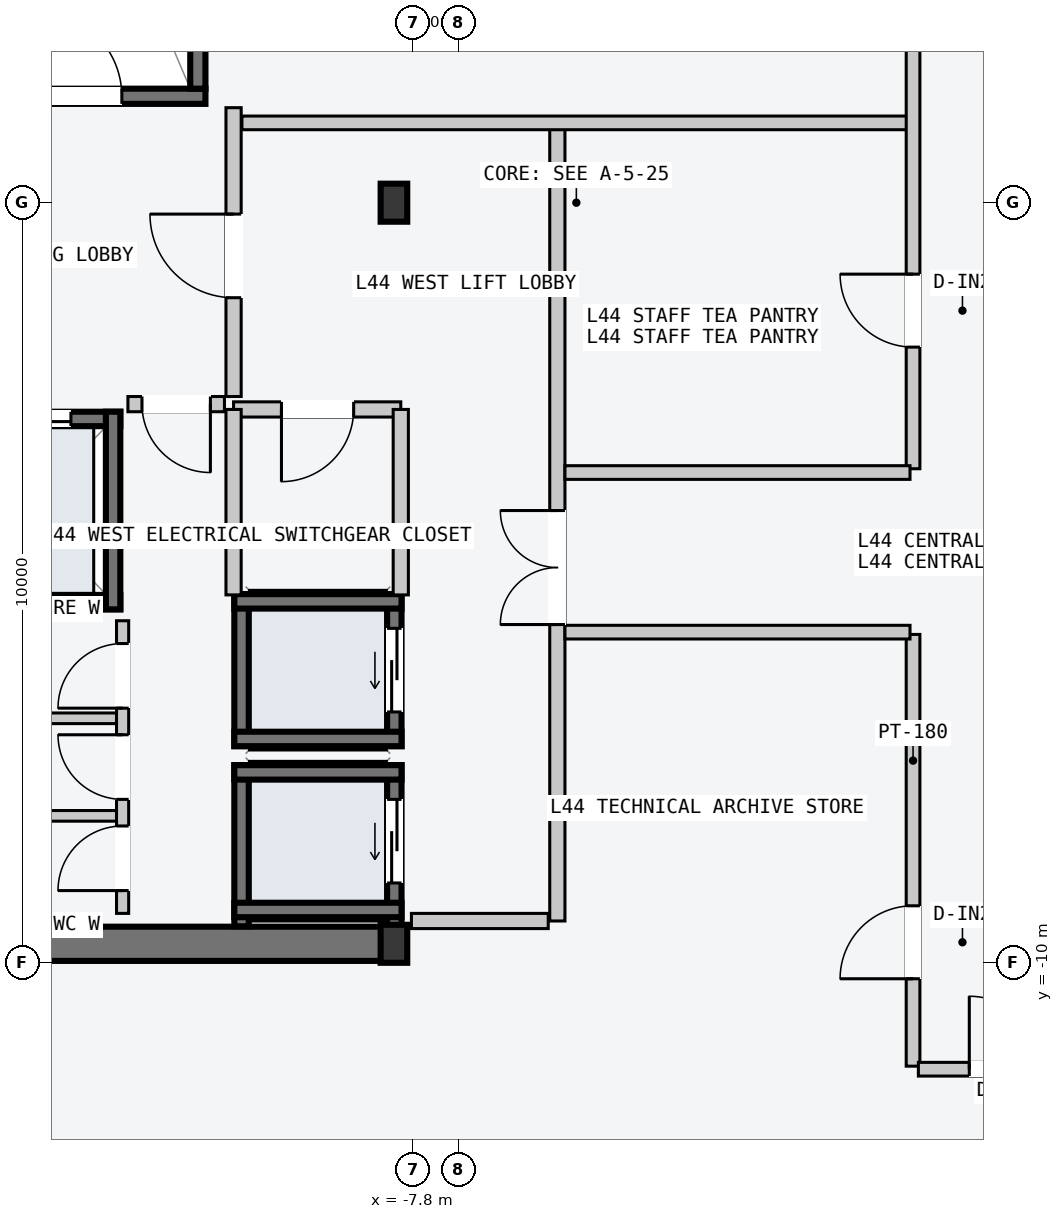
"""IFC4 building model, lengths in metres.
Left out: names, types, materials, properties, quantities, classifications, styles, units other than length and angle.
Written with IfcOpenShell. Run it as: python <this file> out.ifc"""

import sys

from ifc_helpers import new_model, si_unit, direction, frame, frame_2d, origin, origin_2d, place, context, subcontext, project, spatial, rectangle, i_section, extrude, element, fill, save


model = new_model("IFC4")
c1 = context("Model", 3, precision=1e-05, world=origin(), true_north=direction((0.0, 1.0)))
c2 = subcontext(c1, "Body", "Model", "MODEL_VIEW")
j1 = project(units=[si_unit("LENGTHUNIT", "METRE"), si_unit("PLANEANGLEUNIT", "RADIAN")], contexts=[c1])
p1 = place(None, origin())
s1 = spatial("IfcSite", under=j1, at=p1, CompositionType="ELEMENT")
p2 = place(p1, origin())
s2 = spatial("IfcBuilding", under=s1, at=p2, CompositionType="ELEMENT")
p3 = place(p2, frame((0.0, 0.0, 169.5)))
s3 = spatial("IfcBuildingStorey", under=s2, at=p3, CompositionType="ELEMENT", Elevation=169.5)
p4 = place(p3, frame((-14.53, -9.75, -0.2), z_axis=(0.0, 0.0, 1.0), x_axis=(1.0, 0.0, 0.0)))
e1 = element("IfcWall", 1, at=p4, inside=s3, PredefinedType="SHEAR", context=c2, shape_type="SweptSolid", body=[
    extrude(rectangle(XDim=6.46, YDim=0.45, at=frame_2d((3.23, 0.0))), origin(), (0.0, 0.0, 1.0), 3.6),
])
p5 = place(p3, frame((-14.25, 1.4, -0.2), z_axis=(0.0, 0.0, 1.0), x_axis=(1.0, 0.0, 0.0)))
e2 = element("IfcWall", 2, at=p5, inside=s3, PredefinedType="SOLIDWALL", context=c2, shape_type="SweptSolid", body=[
    extrude(rectangle(XDim=3.72, YDim=0.2, at=frame_2d((1.86, 0.0))), origin(), (0.0, 0.0, 1.0), 3.6),
])
p6 = place(p5, frame((1.5, 0.0, 0.2)))
e3 = element("IfcOpeningElement", 3, at=p6, cuts=e2, PredefinedType="OPENING", context=c2, shape_type="SweptSolid", body=[
    extrude(rectangle(XDim=1.12, YDim=2.18, at=frame_2d((0.56, 1.09))), frame((0.0, 0.11, 0.0), z_axis=(0.0, -1.0, 0.0), x_axis=(1.0, 0.0, 0.0)), (0.0, 0.0, 1.0), 0.22),
])
p7 = place(p3, frame((-10.63, 1.5, -0.2), z_axis=(0.0, 0.0, 1.0), x_axis=(0.0, 1.0, 0.0)))
e4 = element("IfcWall", 4, at=p7, inside=s3, PredefinedType="SOLIDWALL", context=c2, shape_type="SweptSolid", body=[
    extrude(rectangle(XDim=7.8, YDim=0.2, at=frame_2d((3.9, 0.0))), origin(), (0.0, 0.0, 1.0), 3.6),
])
for number, where, z_axis, x_axis in (
    (5, (-8.05, -9.75, 0.0), (0.0, 0.0, 1.0), (1.0, 0.0, 0.0)),
    (6, (-8.05, 0.0, 0.0), (0.0, 0.0, 1.0), (1.0, 0.0, 0.0)),
):
    element("IfcColumn", number, at=place(p3, frame(where, z_axis=z_axis, x_axis=x_axis)), inside=s3, PredefinedType="COLUMN", context=c2, shape_type="SweptSolid", body=[
        extrude(i_section(OverallWidth=0.35, OverallDepth=0.5, WebThickness=0.02, FlangeThickness=0.032, at=origin_2d()), origin(), (0.0, 0.0, 1.0), 3.6),
    ])
p8 = place(p3, frame((-8.045, -9.52, -0.2), z_axis=(0.0, 0.0, 1.0), x_axis=(0.0, 1.0, 0.0)))
e7 = element("IfcWall", 7, at=p8, inside=s3, PredefinedType="SOLIDWALL", context=c2, shape_type="SweptSolid", body=[
    extrude(rectangle(XDim=2.12, YDim=0.19, at=frame_2d((1.06, 0.0))), origin(), (0.0, 0.0, 1.0), 3.6),
])
p9 = place(p8, frame((0.57, 0.0, 0.2)))
e8 = element("IfcOpeningElement", 8, at=p9, cuts=e7, PredefinedType="OPENING", context=c2, shape_type="SweptSolid", body=[
    extrude(rectangle(XDim=1.1, YDim=2.2, at=frame_2d((0.55, 1.1))), frame((0.0, 0.105, 0.0), z_axis=(0.0, -1.0, 0.0), x_axis=(1.0, 0.0, 0.0)), (0.0, 0.0, 1.0), 0.21),
])
p10 = place(p3, frame((-10.055, -9.52, -0.2), z_axis=(0.0, 0.0, 1.0), x_axis=(0.0, 1.0, 0.0)))
e9 = element("IfcWall", 9, at=p10, inside=s3, PredefinedType="SOLIDWALL", context=c2, shape_type="SweptSolid", body=[
    extrude(rectangle(XDim=2.12, YDim=0.19, at=frame_2d((1.06, 0.0))), origin(), (0.0, 0.0, 1.0), 3.6),
])
for number, where, z_axis, x_axis in (
    (10, (-10.15, -7.495, -0.2), (0.0, 0.0, 1.0), (1.0, 0.0, 0.0)),
    (11, (-10.15, -9.305, -0.2), (0.0, 0.0, 1.0), (1.0, 0.0, 0.0)),
):
    element("IfcWall", number, at=place(p3, frame(where, z_axis=z_axis, x_axis=x_axis)), inside=s3, PredefinedType="SOLIDWALL", context=c2, shape_type="SweptSolid", body=[
        extrude(rectangle(XDim=2.2, YDim=0.19, at=frame_2d((1.1, 0.0))), origin(), (0.0, 0.0, 1.0), 3.6),
    ])
p11 = place(p3, frame((-8.045, -7.15, -0.2), z_axis=(0.0, 0.0, 1.0), x_axis=(0.0, 1.0, 0.0)))
e12 = element("IfcWall", 12, at=p11, inside=s3, PredefinedType="SOLIDWALL", context=c2, shape_type="SweptSolid", body=[
    extrude(rectangle(XDim=2.0, YDim=0.19, at=frame_2d((1.0, 0.0))), origin(), (0.0, 0.0, 1.0), 3.6),
])
p12 = place(p11, frame((0.45, 0.0, 0.2)))
e13 = element("IfcOpeningElement", 13, at=p12, cuts=e12, PredefinedType="OPENING", context=c2, shape_type="SweptSolid", body=[
    extrude(rectangle(XDim=1.1, YDim=2.2, at=frame_2d((0.55, 1.1))), frame((0.0, 0.105, 0.0), z_axis=(0.0, -1.0, 0.0), x_axis=(1.0, 0.0, 0.0)), (0.0, 0.0, 1.0), 0.21),
])
p13 = place(p3, frame((-10.055, -7.15, -0.2), z_axis=(0.0, 0.0, 1.0), x_axis=(0.0, 1.0, 0.0)))
e14 = element("IfcWall", 14, at=p13, inside=s3, PredefinedType="SOLIDWALL", context=c2, shape_type="SweptSolid", body=[
    extrude(rectangle(XDim=2.0, YDim=0.19, at=frame_2d((1.0, 0.0))), origin(), (0.0, 0.0, 1.0), 3.6),
])
for number, where, z_axis, x_axis in (
    (15, (-10.15, -5.245, -0.2), (0.0, 0.0, 1.0), (1.0, 0.0, 0.0)),
    (16, (-10.15, -7.055, -0.2), (0.0, 0.0, 1.0), (1.0, 0.0, 0.0)),
):
    element("IfcWall", number, at=place(p3, frame(where, z_axis=z_axis, x_axis=x_axis)), inside=s3, PredefinedType="SOLIDWALL", context=c2, shape_type="SweptSolid", body=[
        extrude(rectangle(XDim=2.2, YDim=0.19, at=frame_2d((1.1, 0.0))), origin(), (0.0, 0.0, 1.0), 3.6),
    ])
p14 = place(p3, frame((-14.33, -2.845, -0.2), z_axis=(0.0, 0.0, 1.0), x_axis=(1.0, 0.0, 0.0)))
e17 = element("IfcWall", 17, at=p14, inside=s3, PredefinedType="SOLIDWALL", context=c2, shape_type="SweptSolid", body=[
    extrude(rectangle(XDim=2.68, YDim=0.19, at=frame_2d((1.34, 0.0))), origin(), (0.0, 0.0, 1.0), 3.6),
])
p15 = place(p14, frame((0.83, 0.0, 0.2)))
e18 = element("IfcOpeningElement", 18, at=p15, cuts=e17, PredefinedType="OPENING", context=c2, shape_type="SweptSolid", body=[
    extrude(rectangle(XDim=1.2, YDim=2.2, at=frame_2d((0.6, 1.1))), frame((0.0, 0.105, 0.0), z_axis=(0.0, -1.0, 0.0), x_axis=(1.0, 0.0, 0.0)), (0.0, 0.0, 1.0), 0.21),
])
p16 = place(p3, frame((-14.33, -5.255, -0.2), z_axis=(0.0, 0.0, 1.0), x_axis=(1.0, 0.0, 0.0)))
e19 = element("IfcWall", 19, at=p16, inside=s3, PredefinedType="SOLIDWALL", context=c2, shape_type="SweptSolid", body=[
    extrude(rectangle(XDim=2.68, YDim=0.19, at=frame_2d((1.34, 0.0))), origin(), (0.0, 0.0, 1.0), 3.6),
])
p17 = place(p3, frame((-11.745, -5.35, -0.2), z_axis=(0.0, 0.0, 1.0), x_axis=(0.0, 1.0, 0.0)))
e20 = element("IfcWall", 20, at=p17, inside=s3, PredefinedType="SOLIDWALL", context=c2, shape_type="SweptSolid", body=[
    extrude(rectangle(XDim=2.6, YDim=0.19, at=frame_2d((1.3, 0.0))), origin(), (0.0, 0.0, 1.0), 3.6),
])
p18 = place(p3, frame((-5.9, -9.45, 0.0), z_axis=(0.0, 0.0, 1.0), x_axis=(0.0, 1.0, 0.0)))
e21 = element("IfcWall", 21, at=p18, inside=s3, PredefinedType="PARTITIONING", context=c2, shape_type="SweptSolid", body=[
    extrude(rectangle(XDim=10.5, YDim=0.2, at=frame_2d((5.25, 0.0))), origin(), (0.0, 0.0, 1.0), 3.4),
])
p19 = place(p18, frame((3.9, 0.0, 0.0)))
e22 = element("IfcOpeningElement", 22, at=p19, cuts=e21, PredefinedType="OPENING", context=c2, shape_type="SweptSolid", body=[
    extrude(rectangle(XDim=1.5, YDim=2.2, at=frame_2d((0.75, 1.1))), frame((0.0, 0.11, 0.0), z_axis=(0.0, -1.0, 0.0), x_axis=(1.0, 0.0, 0.0)), (0.0, 0.0, 1.0), 0.22),
])
p20 = place(p3, frame((-6.02, -9.45, 0.0), z_axis=(0.0, 0.0, 1.0), x_axis=(-1.0, 0.0, 0.0)))
e23 = element("IfcWall", 23, at=p20, inside=s3, PredefinedType="PARTITIONING", context=c2, shape_type="SweptSolid", body=[
    extrude(rectangle(XDim=1.8, YDim=0.2, at=frame_2d((0.9, 0.0))), origin(), (0.0, 0.0, 1.0), 3.4),
])
p21 = place(p3, frame((-10.16, -2.55, 0.0), z_axis=(0.0, 0.0, 1.0), x_axis=(0.0, 1.0, 0.0)))
e24 = element("IfcWall", 24, at=p21, inside=s3, PredefinedType="PARTITIONING", context=c2, shape_type="SweptSolid", body=[
    extrude(rectangle(XDim=3.8, YDim=0.2, at=frame_2d((1.9, 0.0))), origin(), (0.0, 0.0, 1.0), 3.4),
])
p22 = place(p21, frame((1.3, 0.0, 0.0)))
e25 = element("IfcOpeningElement", 25, at=p22, cuts=e24, PredefinedType="OPENING", context=c2, shape_type="SweptSolid", body=[
    extrude(rectangle(XDim=1.1, YDim=2.15, at=frame_2d((0.55, 1.075))), frame((0.0, 0.11, 0.0), z_axis=(0.0, -1.0, 0.0), x_axis=(1.0, 0.0, 0.0)), (0.0, 0.0, 1.0), 0.22),
])
p23 = place(p3, frame((-10.28, -2.65, 0.0), z_axis=(0.0, 0.0, 1.0), x_axis=(-1.0, 0.0, 0.0)))
e26 = element("IfcWall", 26, at=p23, inside=s3, PredefinedType="PARTITIONING", context=c2, shape_type="SweptSolid", body=[
    extrude(rectangle(XDim=1.27, YDim=0.2, at=frame_2d((0.635, 0.0))), origin(), (0.0, 0.0, 1.0), 3.4),
])
p24 = place(p23, frame((0.185, 0.0, 0.0)))
e27 = element("IfcOpeningElement", 27, at=p24, cuts=e26, PredefinedType="OPENING", context=c2, shape_type="SweptSolid", body=[
    extrude(rectangle(XDim=0.9, YDim=2.15, at=frame_2d((0.45, 1.075))), frame((0.0, 0.11, 0.0), z_axis=(0.0, -1.0, 0.0), x_axis=(1.0, 0.0, 0.0)), (0.0, 0.0, 1.0), 0.22),
])
p25 = place(p3, frame((-7.96, -2.72, 0.0), z_axis=(0.0, 0.0, 1.0), x_axis=(-1.0, 0.0, 0.0)))
e28 = element("IfcWall", 28, at=p25, inside=s3, PredefinedType="PARTITIONING", context=c2, shape_type="SweptSolid", body=[
    extrude(rectangle(XDim=2.2, YDim=0.2, at=frame_2d((1.1, 0.0))), origin(), (0.0, 0.0, 1.0), 3.4),
])
p26 = place(p25, frame((0.62, 0.0, 0.0)))
e29 = element("IfcOpeningElement", 29, at=p26, cuts=e28, PredefinedType="OPENING", context=c2, shape_type="SweptSolid", body=[
    extrude(rectangle(XDim=0.95, YDim=2.1, at=frame_2d((0.475, 1.05))), frame((0.0, 0.11, 0.0), z_axis=(0.0, -1.0, 0.0), x_axis=(1.0, 0.0, 0.0)), (0.0, 0.0, 1.0), 0.22),
])
for number, where, z_axis, x_axis in (
    (30, (-7.96, -5.16, 0.0), (0.0, 0.0, 1.0), (0.0, 1.0, 0.0)),
    (31, (-10.16, -5.16, 0.0), (0.0, 0.0, 1.0), (0.0, 1.0, 0.0)),
):
    element("IfcWall", number, at=place(p3, frame(where, z_axis=z_axis, x_axis=x_axis)), inside=s3, PredefinedType="PARTITIONING", context=c2, shape_type="SweptSolid", body=[
        extrude(rectangle(XDim=2.44, YDim=0.2, at=frame_2d((1.22, 0.0))), origin(), (0.0, 0.0, 1.0), 3.4),
    ])
for number, where, z_axis, x_axis in (
    (32, (-11.7, -8.067, 0.0), (0.0, 0.0, 1.0), (-1.0, 0.0, 0.0)),
    (33, (-11.7, -6.783, 0.0), (0.0, 0.0, 1.0), (-1.0, 0.0, 0.0)),
):
    element("IfcWall", number, at=place(p3, frame(where, z_axis=z_axis, x_axis=x_axis)), inside=s3, PredefinedType="PARTITIONING", context=c2, shape_type="SweptSolid", body=[
        extrude(rectangle(XDim=2.5, YDim=0.14, at=frame_2d((1.25, 0.0))), origin(), (0.0, 0.0, 1.0), 3.4),
    ])
p27 = place(p3, frame((-11.62, -9.35, 0.0), z_axis=(0.0, 0.0, 1.0), x_axis=(0.0, 1.0, 0.0)))
e34 = element("IfcWall", 34, at=p27, inside=s3, PredefinedType="PARTITIONING", context=c2, shape_type="SweptSolid", body=[
    extrude(rectangle(XDim=3.85, YDim=0.16, at=frame_2d((1.925, 0.0))), origin(), (0.0, 0.0, 1.0), 3.4),
])
p28 = place(p27, frame((0.3, 0.0, 0.0)))
e35 = element("IfcOpeningElement", 35, at=p28, cuts=e34, PredefinedType="OPENING", context=c2, shape_type="SweptSolid", body=[
    extrude(rectangle(XDim=0.85, YDim=2.12, at=frame_2d((0.425, 1.06))), frame((0.0, 0.09, 0.0), z_axis=(0.0, -1.0, 0.0), x_axis=(1.0, 0.0, 0.0)), (0.0, 0.0, 1.0), 0.18),
])
p29 = place(p27, frame((1.5, 0.0, 0.0)))
e36 = element("IfcOpeningElement", 36, at=p29, cuts=e34, PredefinedType="OPENING", context=c2, shape_type="SweptSolid", body=[
    extrude(rectangle(XDim=0.85, YDim=2.12, at=frame_2d((0.425, 1.06))), frame((0.0, 0.09, 0.0), z_axis=(0.0, -1.0, 0.0), x_axis=(1.0, 0.0, 0.0)), (0.0, 0.0, 1.0), 0.18),
])
p30 = place(p27, frame((2.7, 0.0, 0.0)))
e37 = element("IfcOpeningElement", 37, at=p30, cuts=e34, PredefinedType="OPENING", context=c2, shape_type="SweptSolid", body=[
    extrude(rectangle(XDim=0.85, YDim=2.12, at=frame_2d((0.425, 1.06))), frame((0.0, 0.09, 0.0), z_axis=(0.0, -1.0, 0.0), x_axis=(1.0, 0.0, 0.0)), (0.0, 0.0, 1.0), 0.18),
])
p31 = place(p3, frame((-10.05, 1.05, 0.0), z_axis=(0.0, 0.0, 1.0), x_axis=(1.0, 0.0, 0.0)))
e38 = element("IfcWall", 38, at=p31, inside=s3, PredefinedType="PARTITIONING", context=c2, shape_type="SweptSolid", body=[
    extrude(rectangle(XDim=8.79, YDim=0.18, at=frame_2d((4.395, 0.0))), origin(), (0.0, 0.0, 1.0), 3.4),
])
p32 = place(p3, frame((-1.22, -3.5, 0.0), z_axis=(0.0, 0.0, 1.0), x_axis=(0.0, 1.0, 0.0)))
e39 = element("IfcWall", 39, at=p32, inside=s3, PredefinedType="PARTITIONING", context=c2, shape_type="SweptSolid", body=[
    extrude(rectangle(XDim=14.86, YDim=0.18, at=frame_2d((7.43, 0.0))), origin(), (0.0, 0.0, 1.0), 3.4),
])
p33 = place(p32, frame((6.1, 0.0, 0.0)))
e40 = element("IfcOpeningElement", 40, at=p33, cuts=e39, PredefinedType="OPENING", context=c2, shape_type="SweptSolid", body=[
    extrude(rectangle(XDim=1.24, YDim=2.24, at=frame_2d((0.62, 1.12))), frame((0.0, 0.1, 0.0), z_axis=(0.0, -1.0, 0.0), x_axis=(1.0, 0.0, 0.0)), (0.0, 0.0, 1.0), 0.2),
])
p34 = place(p32, frame((1.6, 0.0, 0.0)))
e41 = element("IfcOpeningElement", 41, at=p34, cuts=e39, PredefinedType="OPENING", context=c2, shape_type="SweptSolid", body=[
    extrude(rectangle(XDim=0.96, YDim=2.18, at=frame_2d((0.48, 1.09))), frame((0.0, 0.1, 0.0), z_axis=(0.0, -1.0, 0.0), x_axis=(1.0, 0.0, 0.0)), (0.0, 0.0, 1.0), 0.2),
])
p35 = place(p3, frame((-5.8, -3.55, 0.0), z_axis=(0.0, 0.0, 1.0), x_axis=(1.0, 0.0, 0.0)))
e42 = element("IfcWall", 42, at=p35, inside=s3, PredefinedType="PARTITIONING", context=c2, shape_type="SweptSolid", body=[
    extrude(rectangle(XDim=4.54, YDim=0.18, at=frame_2d((2.27, 0.0))), origin(), (0.0, 0.0, 1.0), 3.4),
])
p36 = place(p3, frame((-1.22, -11.36, 0.0), z_axis=(0.0, 0.0, 1.0), x_axis=(0.0, 1.0, 0.0)))
e43 = element("IfcWall", 43, at=p36, inside=s3, PredefinedType="PARTITIONING", context=c2, shape_type="SweptSolid", body=[
    extrude(rectangle(XDim=5.68, YDim=0.18, at=frame_2d((2.84, 0.0))), origin(), (0.0, 0.0, 1.0), 3.4),
])
p37 = place(p36, frame((1.15, 0.0, 0.0)))
e44 = element("IfcOpeningElement", 44, at=p37, cuts=e43, PredefinedType="OPENING", context=c2, shape_type="SweptSolid", body=[
    extrude(rectangle(XDim=0.96, YDim=2.18, at=frame_2d((0.48, 1.09))), frame((0.0, 0.1, 0.0), z_axis=(0.0, -1.0, 0.0), x_axis=(1.0, 0.0, 0.0)), (0.0, 0.0, 1.0), 0.2),
])
p38 = place(p3, frame((-5.8, -5.65, 0.0), z_axis=(0.0, 0.0, 1.0), x_axis=(1.0, 0.0, 0.0)))
e45 = element("IfcWall", 45, at=p38, inside=s3, PredefinedType="PARTITIONING", context=c2, shape_type="SweptSolid", body=[
    extrude(rectangle(XDim=4.54, YDim=0.18, at=frame_2d((2.27, 0.0))), origin(), (0.0, 0.0, 1.0), 3.4),
])
p39 = place(p3, frame((-1.15, -11.4, 0.0), z_axis=(0.0, 0.0, 1.0), x_axis=(1.0, 0.0, 0.0)))
e46 = element("IfcWall", 46, at=p39, inside=s3, PredefinedType="PARTITIONING", context=c2, shape_type="SweptSolid", body=[
    extrude(rectangle(XDim=2.3, YDim=0.18, at=frame_2d((1.15, 0.0))), origin(), (0.0, 0.0, 1.0), 3.4),
])
p40 = place(p39, frame((0.67, 0.0, 0.0)))
e47 = element("IfcOpeningElement", 47, at=p40, cuts=e46, PredefinedType="OPENING", context=c2, shape_type="SweptSolid", body=[
    extrude(rectangle(XDim=0.96, YDim=2.18, at=frame_2d((0.48, 1.09))), frame((0.0, 0.1, 0.0), z_axis=(0.0, -1.0, 0.0), x_axis=(1.0, 0.0, 0.0)), (0.0, 0.0, 1.0), 0.2),
])
p41 = place(p6, origin())
e48 = element("IfcDoor", 48, at=p41, inside=s3, OperationType="SINGLE_SWING_LEFT", PredefinedType="DOOR", context=c2, shape_type="SweptSolid", body=[
    extrude(rectangle(XDim=1.12, YDim=2.18, at=frame_2d((0.56, 1.09))), frame((0.0, 0.025, 0.0), z_axis=(0.0, -1.0, 0.0), x_axis=(1.0, 0.0, 0.0)), (0.0, 0.0, 1.0), 0.05),
])
fill(e3, e48)
p42 = place(p9, origin())
e49 = element("IfcDoor", 49, at=p42, inside=s3, OperationType="SLIDING_TO_LEFT", PredefinedType="DOOR", context=c2, shape_type="SweptSolid", body=[
    extrude(rectangle(XDim=1.1, YDim=2.2, at=frame_2d((0.55, 1.1))), frame((0.0, 0.025, 0.0), z_axis=(0.0, -1.0, 0.0), x_axis=(1.0, 0.0, 0.0)), (0.0, 0.0, 1.0), 0.05),
])
fill(e8, e49)
p43 = place(p12, origin())
e50 = element("IfcDoor", 50, at=p43, inside=s3, OperationType="SLIDING_TO_LEFT", PredefinedType="DOOR", context=c2, shape_type="SweptSolid", body=[
    extrude(rectangle(XDim=1.1, YDim=2.2, at=frame_2d((0.55, 1.1))), frame((0.0, 0.025, 0.0), z_axis=(0.0, -1.0, 0.0), x_axis=(1.0, 0.0, 0.0)), (0.0, 0.0, 1.0), 0.05),
])
fill(e13, e50)
p44 = place(p15, origin())
e51 = element("IfcDoor", 51, at=p44, inside=s3, OperationType="SLIDING_TO_LEFT", PredefinedType="DOOR", context=c2, shape_type="SweptSolid", body=[
    extrude(rectangle(XDim=1.2, YDim=2.2, at=frame_2d((0.6, 1.1))), frame((0.0, 0.025, 0.0), z_axis=(0.0, -1.0, 0.0), x_axis=(1.0, 0.0, 0.0)), (0.0, 0.0, 1.0), 0.05),
])
fill(e18, e51)
p45 = place(p19, origin())
e52 = element("IfcDoor", 52, at=p45, inside=s3, OperationType="DOUBLE_DOOR_SINGLE_SWING", PredefinedType="DOOR", context=c2, shape_type="SweptSolid", body=[
    extrude(rectangle(XDim=1.5, YDim=2.2, at=frame_2d((0.75, 1.1))), frame((0.0, 0.025, 0.0), z_axis=(0.0, -1.0, 0.0), x_axis=(1.0, 0.0, 0.0)), (0.0, 0.0, 1.0), 0.05),
])
fill(e22, e52)
p46 = place(p22, origin())
e53 = element("IfcDoor", 53, at=p46, inside=s3, OperationType="SINGLE_SWING_RIGHT", PredefinedType="DOOR", context=c2, shape_type="SweptSolid", body=[
    extrude(rectangle(XDim=1.1, YDim=2.15, at=frame_2d((0.55, 1.075))), frame((0.0, 0.025, 0.0), z_axis=(0.0, -1.0, 0.0), x_axis=(1.0, 0.0, 0.0)), (0.0, 0.0, 1.0), 0.05),
])
fill(e25, e53)
p47 = place(p24, origin())
e54 = element("IfcDoor", 54, at=p47, inside=s3, OperationType="SINGLE_SWING_LEFT", PredefinedType="DOOR", context=c2, shape_type="SweptSolid", body=[
    extrude(rectangle(XDim=0.9, YDim=2.15, at=frame_2d((0.45, 1.075))), frame((0.0, 0.025, 0.0), z_axis=(0.0, -1.0, 0.0), x_axis=(1.0, 0.0, 0.0)), (0.0, 0.0, 1.0), 0.05),
])
fill(e27, e54)
p48 = place(p26, origin())
e55 = element("IfcDoor", 55, at=p48, inside=s3, OperationType="SINGLE_SWING_RIGHT", PredefinedType="DOOR", context=c2, shape_type="SweptSolid", body=[
    extrude(rectangle(XDim=0.95, YDim=2.1, at=frame_2d((0.475, 1.05))), frame((0.0, 0.025, 0.0), z_axis=(0.0, -1.0, 0.0), x_axis=(1.0, 0.0, 0.0)), (0.0, 0.0, 1.0), 0.05),
])
fill(e29, e55)
p49 = place(p28, origin())
e56 = element("IfcDoor", 56, at=p49, inside=s3, OperationType="SINGLE_SWING_LEFT", PredefinedType="DOOR", context=c2, shape_type="SweptSolid", body=[
    extrude(rectangle(XDim=0.85, YDim=2.12, at=frame_2d((0.425, 1.06))), frame((0.0, 0.025, 0.0), z_axis=(0.0, -1.0, 0.0), x_axis=(1.0, 0.0, 0.0)), (0.0, 0.0, 1.0), 0.05),
])
fill(e35, e56)
p50 = place(p29, origin())
e57 = element("IfcDoor", 57, at=p50, inside=s3, OperationType="SINGLE_SWING_RIGHT", PredefinedType="DOOR", context=c2, shape_type="SweptSolid", body=[
    extrude(rectangle(XDim=0.85, YDim=2.12, at=frame_2d((0.425, 1.06))), frame((0.0, 0.025, 0.0), z_axis=(0.0, -1.0, 0.0), x_axis=(1.0, 0.0, 0.0)), (0.0, 0.0, 1.0), 0.05),
])
fill(e36, e57)
p51 = place(p30, origin())
e58 = element("IfcDoor", 58, at=p51, inside=s3, OperationType="SINGLE_SWING_LEFT", PredefinedType="DOOR", context=c2, shape_type="SweptSolid", body=[
    extrude(rectangle(XDim=0.85, YDim=2.12, at=frame_2d((0.425, 1.06))), frame((0.0, 0.025, 0.0), z_axis=(0.0, -1.0, 0.0), x_axis=(1.0, 0.0, 0.0)), (0.0, 0.0, 1.0), 0.05),
])
fill(e37, e58)
p52 = place(p34, origin())
e59 = element("IfcDoor", 59, at=p52, inside=s3, OperationType="SINGLE_SWING_RIGHT", PredefinedType="DOOR", context=c2, shape_type="SweptSolid", body=[
    extrude(rectangle(XDim=0.96, YDim=2.18, at=frame_2d((0.48, 1.09))), frame((0.0, 0.025, 0.0), z_axis=(0.0, -1.0, 0.0), x_axis=(1.0, 0.0, 0.0)), (0.0, 0.0, 1.0), 0.05),
])
fill(e41, e59)
p53 = place(p37, origin())
e60 = element("IfcDoor", 60, at=p53, inside=s3, OperationType="SINGLE_SWING_LEFT", PredefinedType="DOOR", context=c2, shape_type="SweptSolid", body=[
    extrude(rectangle(XDim=0.96, YDim=2.18, at=frame_2d((0.48, 1.09))), frame((0.0, 0.025, 0.0), z_axis=(0.0, -1.0, 0.0), x_axis=(1.0, 0.0, 0.0)), (0.0, 0.0, 1.0), 0.05),
])
fill(e44, e60)
p54 = place(p40, origin())
e61 = element("IfcDoor", 61, at=p54, inside=s3, OperationType="SINGLE_SWING_LEFT", PredefinedType="DOOR", context=c2, shape_type="SweptSolid", body=[
    extrude(rectangle(XDim=0.96, YDim=2.18, at=frame_2d((0.48, 1.09))), frame((0.0, 0.025, 0.0), z_axis=(0.0, -1.0, 0.0), x_axis=(1.0, 0.0, 0.0)), (0.0, 0.0, 1.0), 0.05),
])
fill(e47, e61)
save(model, sys.argv[1])
